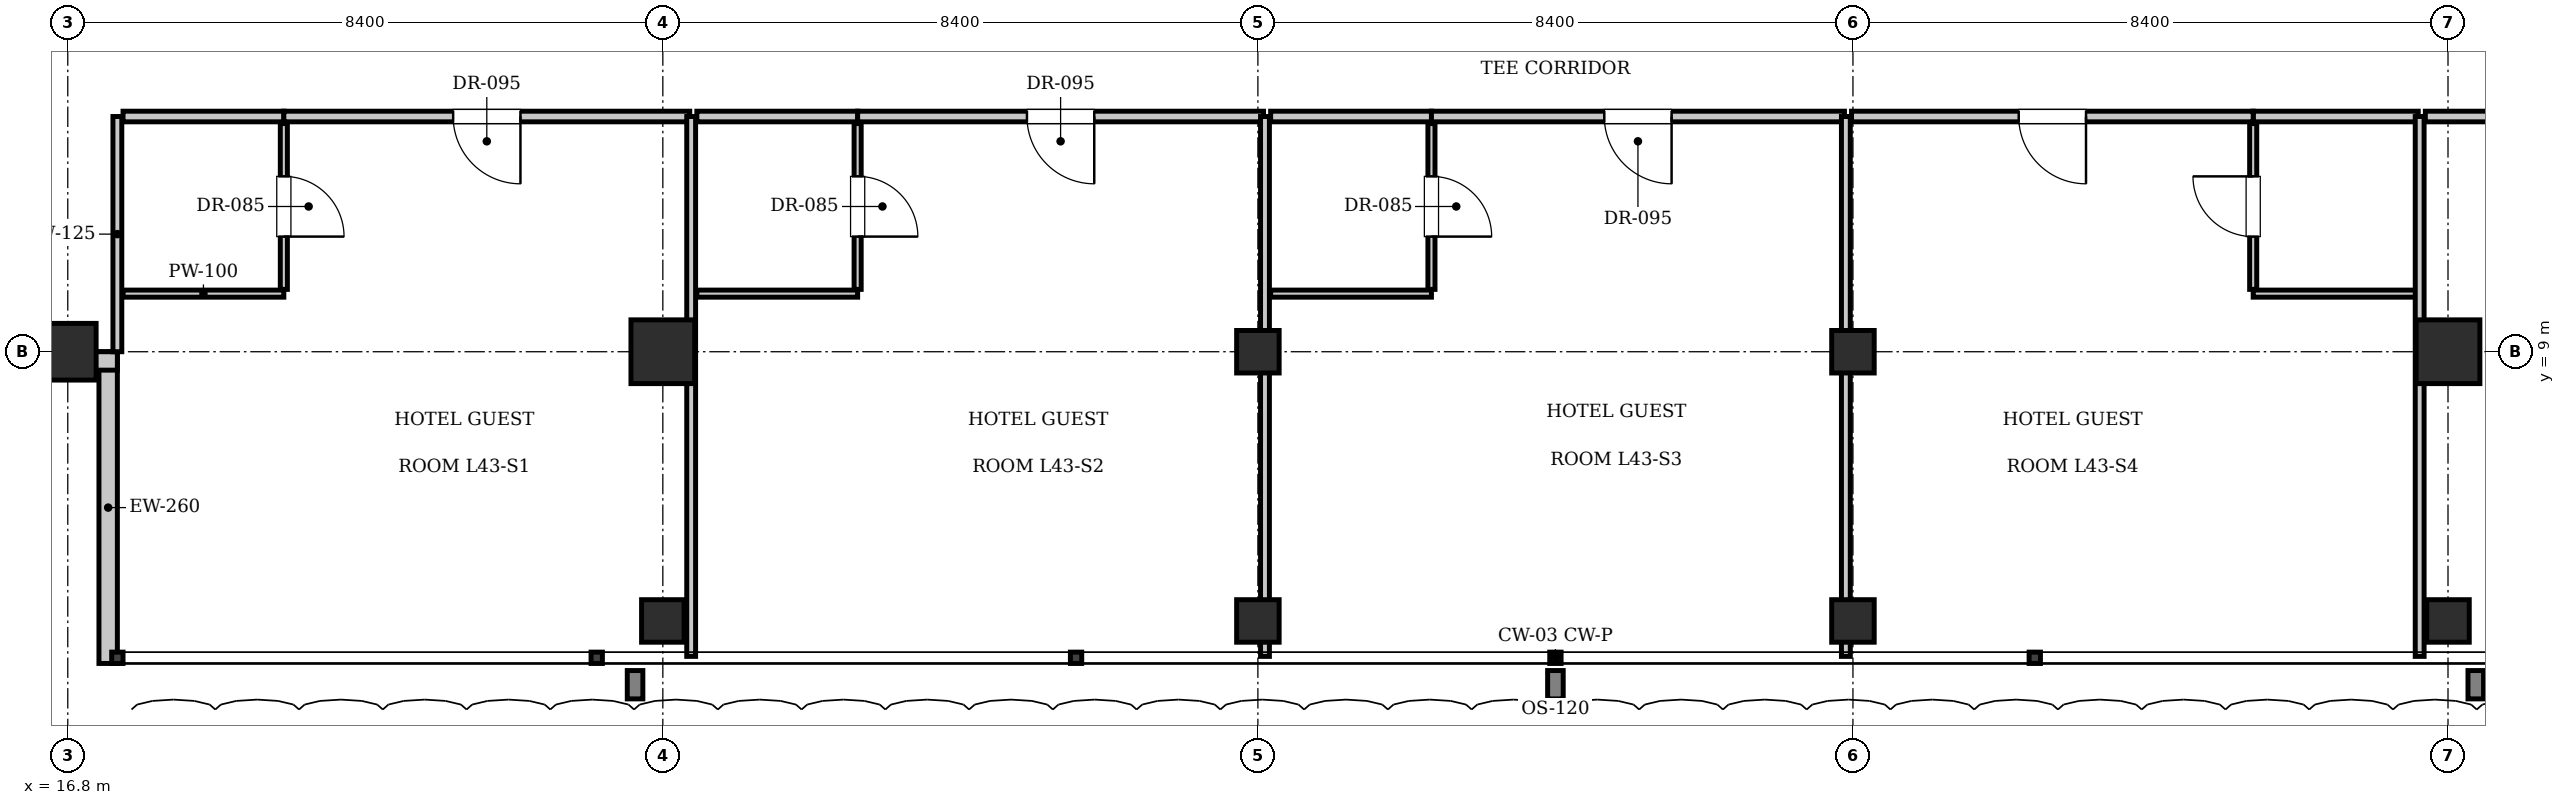
"""IFC4 building model, lengths in metres.
Left out: names, types, materials, properties, quantities, classifications, styles, units other than length and angle.
Written with IfcOpenShell. Run it as: python <this file> out.ifc"""

import sys

from ifc_helpers import new_model, si_unit, direction, frame, frame_2d, origin, origin_2d, place, context, subcontext, project, spatial, rectangle, i_section, extrude, element, fill, save


model = new_model("IFC4")
c1 = context("Model", 3, precision=1e-05, world=origin(), true_north=direction((0.0, 1.0)))
c2 = subcontext(c1, "Body", "Model", "MODEL_VIEW")
j1 = project(units=[si_unit("LENGTHUNIT", "METRE"), si_unit("PLANEANGLEUNIT", "RADIAN")], contexts=[c1])
p1 = place(None, origin())
s1 = spatial("IfcSite", under=j1, at=p1, CompositionType="ELEMENT")
p2 = place(p1, origin())
s2 = spatial("IfcBuilding", under=s1, at=p2, CompositionType="ELEMENT")
p3 = place(p2, frame((0.0, 0.0, 177.45)))
s3 = spatial("IfcBuildingStorey", under=s2, at=p3, CompositionType="ELEMENT", Elevation=177.45)
for number, where, z_axis, x_axis in (
    (1, (25.2, 9.0, 0.0), (0.0, 0.0, 1.0), (1.0, 0.0, 0.0)),
    (2, (50.4, 9.0, 0.0), (0.0, 0.0, 1.0), (1.0, 0.0, 0.0)),
):
    element("IfcColumn", number, at=place(p3, frame(where, z_axis=z_axis, x_axis=x_axis)), inside=s3, PredefinedType="COLUMN", context=c2, shape_type="SweptSolid", body=[
        extrude(rectangle(XDim=0.9, YDim=0.9, at=origin_2d()), origin(), (0.0, 0.0, 1.0), 3.85),
    ])
for number, where, z_axis, x_axis in (
    (3, (33.6, 9.0, 0.0), (0.0, 0.0, 1.0), (1.0, 0.0, 0.0)),
    (4, (42.0, 9.0, 0.0), (0.0, 0.0, 1.0), (1.0, 0.0, 0.0)),
):
    element("IfcColumn", number, at=place(p3, frame(where, z_axis=z_axis, x_axis=x_axis)), inside=s3, PredefinedType="COLUMN", context=c2, shape_type="SweptSolid", body=[
        extrude(i_section(OverallWidth=0.6, OverallDepth=0.6, WebThickness=0.025, FlangeThickness=0.038, at=origin_2d()), origin(), (0.0, 0.0, 1.0), 3.85),
    ])
p4 = place(p3, frame((16.8, 9.0, 0.0), z_axis=(0.0, 0.0, 1.0), x_axis=(1.0, 0.0, 0.0)))
e5 = element("IfcColumn", 5, at=p4, inside=s3, PredefinedType="COLUMN", context=c2, shape_type="SweptSolid", body=[
    extrude(rectangle(XDim=0.8, YDim=0.8, at=origin_2d()), origin(), (0.0, 0.0, 1.0), 3.85),
])
for number, where, z_axis, x_axis in (
    (6, (25.2, 5.2, 0.0), (0.0, 0.0, 1.0), (1.0, 0.0, 0.0)),
    (7, (33.6, 5.2, 0.0), (0.0, 0.0, 1.0), (1.0, 0.0, 0.0)),
    (8, (42.0, 5.2, 0.0), (0.0, 0.0, 1.0), (1.0, 0.0, 0.0)),
    (9, (50.4, 5.2, 0.0), (0.0, 0.0, 1.0), (1.0, 0.0, 0.0)),
):
    element("IfcColumn", number, at=place(p3, frame(where, z_axis=z_axis, x_axis=x_axis)), inside=s3, PredefinedType="COLUMN", context=c2, shape_type="SweptSolid", body=[
        extrude(i_section(OverallWidth=0.6, OverallDepth=0.6, WebThickness=0.025, FlangeThickness=0.038, at=origin_2d()), origin(), (0.0, 0.0, 1.0), 3.85),
    ])
p5 = place(p3, frame((17.37, 4.6, 0.0), z_axis=(0.0, 0.0, 1.0), x_axis=(0.0, 1.0, 0.0)))
e10 = element("IfcWall", 10, at=p5, inside=s3, PredefinedType="SOLIDWALL", context=c2, shape_type="SweptSolid", body=[
    extrude(rectangle(XDim=4.4, YDim=0.26, at=frame_2d((2.2, 0.0))), origin(), (0.0, 0.0, 1.0), 3.61),
])
p6 = place(p3, frame((17.5, 8.87, 0.0), z_axis=(0.0, 0.0, 1.0), x_axis=(-1.0, 0.0, 0.0)))
e11 = element("IfcWall", 11, at=p6, inside=s3, PredefinedType="SOLIDWALL", context=c2, shape_type="SweptSolid", body=[
    extrude(rectangle(XDim=4.4, YDim=0.26, at=frame_2d((2.2, 0.0))), origin(), (0.0, 0.0, 1.0), 3.007),
])
p7 = place(p3, frame((17.5, 9.0, 0.0), z_axis=(0.0, 0.0, 1.0), x_axis=(0.0, 1.0, 0.0)))
e12 = element("IfcWall", 12, at=p7, inside=s3, PredefinedType="PARTITIONING", context=c2, shape_type="SweptSolid", body=[
    extrude(rectangle(XDim=3.32, YDim=0.125, at=frame_2d((1.66, 0.0))), origin(), (0.0, 0.0, 1.0), 3.61),
])
p8 = place(p3, frame((17.58, 12.32, 0.0), z_axis=(0.0, 0.0, 1.0), x_axis=(1.0, 0.0, 0.0)))
e13 = element("IfcWall", 13, at=p8, inside=s3, PredefinedType="PARTITIONING", context=c2, shape_type="SweptSolid", body=[
    extrude(rectangle(XDim=2.27, YDim=0.15, at=frame_2d((1.135, 0.0))), origin(), (0.0, 0.0, 1.0), 3.61),
])
p9 = place(p3, frame((17.58, 9.82, 0.0), z_axis=(0.0, 0.0, 1.0), x_axis=(1.0, 0.0, 0.0)))
e14 = element("IfcWall", 14, at=p9, inside=s3, PredefinedType="PARTITIONING", context=c2, shape_type="SweptSolid", body=[
    extrude(rectangle(XDim=2.27, YDim=0.1, at=frame_2d((1.135, 0.0))), origin(), (0.0, 0.0, 1.0), 3.61),
])
p10 = place(p3, frame((19.85, 9.88, 0.0), z_axis=(0.0, 0.0, 1.0), x_axis=(0.0, 1.0, 0.0)))
e15 = element("IfcWall", 15, at=p10, inside=s3, PredefinedType="PARTITIONING", context=c2, shape_type="SweptSolid", body=[
    extrude(rectangle(XDim=2.34, YDim=0.1, at=frame_2d((1.17, 0.0))), origin(), (0.0, 0.0, 1.0), 3.61),
])
p11 = place(p10, frame((0.745, 0.0, 0.0)))
e16 = element("IfcOpeningElement", 16, at=p11, cuts=e15, PredefinedType="OPENING", context=c2, shape_type="SweptSolid", body=[
    extrude(rectangle(XDim=0.85, YDim=2.1, at=frame_2d((0.425, 1.05))), frame((0.0, 0.06, 0.0), z_axis=(0.0, -1.0, 0.0), x_axis=(1.0, 0.0, 0.0)), (0.0, 0.0, 1.0), 0.12),
])
p12 = place(p3, frame((19.85, 12.32, 0.0), z_axis=(0.0, 0.0, 1.0), x_axis=(1.0, 0.0, 0.0)))
e17 = element("IfcWall", 17, at=p12, inside=s3, PredefinedType="PARTITIONING", context=c2, shape_type="SweptSolid", body=[
    extrude(rectangle(XDim=5.73, YDim=0.15, at=frame_2d((2.865, 0.0))), origin(), (0.0, 0.0, 1.0), 3.61),
])
p13 = place(p12, frame((2.39, 0.0, 0.0)))
e18 = element("IfcOpeningElement", 18, at=p13, cuts=e17, PredefinedType="OPENING", context=c2, shape_type="SweptSolid", body=[
    extrude(rectangle(XDim=0.95, YDim=2.15, at=frame_2d((0.475, 1.075))), frame((0.0, 0.085, 0.0), z_axis=(0.0, -1.0, 0.0), x_axis=(1.0, 0.0, 0.0)), (0.0, 0.0, 1.0), 0.17),
])
p14 = place(p3, frame((25.6, 4.7, 0.0), z_axis=(0.0, 0.0, 1.0), x_axis=(0.0, 1.0, 0.0)))
e19 = element("IfcWall", 19, at=p14, inside=s3, PredefinedType="PARTITIONING", context=c2, shape_type="SweptSolid", body=[
    extrude(rectangle(XDim=7.62, YDim=0.125, at=frame_2d((3.81, 0.0))), origin(), (0.0, 0.0, 1.0), 3.61),
])
p15 = place(p3, frame((25.68, 12.32, 0.0), z_axis=(0.0, 0.0, 1.0), x_axis=(1.0, 0.0, 0.0)))
e20 = element("IfcWall", 20, at=p15, inside=s3, PredefinedType="PARTITIONING", context=c2, shape_type="SweptSolid", body=[
    extrude(rectangle(XDim=2.27, YDim=0.15, at=frame_2d((1.135, 0.0))), origin(), (0.0, 0.0, 1.0), 3.61),
])
p16 = place(p3, frame((25.68, 9.82, 0.0), z_axis=(0.0, 0.0, 1.0), x_axis=(1.0, 0.0, 0.0)))
e21 = element("IfcWall", 21, at=p16, inside=s3, PredefinedType="PARTITIONING", context=c2, shape_type="SweptSolid", body=[
    extrude(rectangle(XDim=2.27, YDim=0.1, at=frame_2d((1.135, 0.0))), origin(), (0.0, 0.0, 1.0), 3.61),
])
p17 = place(p3, frame((27.95, 9.88, 0.0), z_axis=(0.0, 0.0, 1.0), x_axis=(0.0, 1.0, 0.0)))
e22 = element("IfcWall", 22, at=p17, inside=s3, PredefinedType="PARTITIONING", context=c2, shape_type="SweptSolid", body=[
    extrude(rectangle(XDim=2.34, YDim=0.1, at=frame_2d((1.17, 0.0))), origin(), (0.0, 0.0, 1.0), 3.61),
])
p18 = place(p17, frame((0.745, 0.0, 0.0)))
e23 = element("IfcOpeningElement", 23, at=p18, cuts=e22, PredefinedType="OPENING", context=c2, shape_type="SweptSolid", body=[
    extrude(rectangle(XDim=0.85, YDim=2.1, at=frame_2d((0.425, 1.05))), frame((0.0, 0.06, 0.0), z_axis=(0.0, -1.0, 0.0), x_axis=(1.0, 0.0, 0.0)), (0.0, 0.0, 1.0), 0.12),
])
p19 = place(p3, frame((27.95, 12.32, 0.0), z_axis=(0.0, 0.0, 1.0), x_axis=(1.0, 0.0, 0.0)))
e24 = element("IfcWall", 24, at=p19, inside=s3, PredefinedType="PARTITIONING", context=c2, shape_type="SweptSolid", body=[
    extrude(rectangle(XDim=5.73, YDim=0.15, at=frame_2d((2.865, 0.0))), origin(), (0.0, 0.0, 1.0), 3.61),
])
p20 = place(p19, frame((2.39, 0.0, 0.0)))
e25 = element("IfcOpeningElement", 25, at=p20, cuts=e24, PredefinedType="OPENING", context=c2, shape_type="SweptSolid", body=[
    extrude(rectangle(XDim=0.95, YDim=2.15, at=frame_2d((0.475, 1.075))), frame((0.0, 0.085, 0.0), z_axis=(0.0, -1.0, 0.0), x_axis=(1.0, 0.0, 0.0)), (0.0, 0.0, 1.0), 0.17),
])
p21 = place(p3, frame((33.7, 4.7, 0.0), z_axis=(0.0, 0.0, 1.0), x_axis=(0.0, 1.0, 0.0)))
e26 = element("IfcWall", 26, at=p21, inside=s3, PredefinedType="PARTITIONING", context=c2, shape_type="SweptSolid", body=[
    extrude(rectangle(XDim=7.62, YDim=0.125, at=frame_2d((3.81, 0.0))), origin(), (0.0, 0.0, 1.0), 3.007),
])
p22 = place(p3, frame((33.78, 12.32, 0.0), z_axis=(0.0, 0.0, 1.0), x_axis=(1.0, 0.0, 0.0)))
e27 = element("IfcWall", 27, at=p22, inside=s3, PredefinedType="PARTITIONING", context=c2, shape_type="SweptSolid", body=[
    extrude(rectangle(XDim=2.27, YDim=0.15, at=frame_2d((1.135, 0.0))), origin(), (0.0, 0.0, 1.0), 3.61),
])
p23 = place(p3, frame((33.78, 9.82, 0.0), z_axis=(0.0, 0.0, 1.0), x_axis=(1.0, 0.0, 0.0)))
e28 = element("IfcWall", 28, at=p23, inside=s3, PredefinedType="PARTITIONING", context=c2, shape_type="SweptSolid", body=[
    extrude(rectangle(XDim=2.27, YDim=0.1, at=frame_2d((1.135, 0.0))), origin(), (0.0, 0.0, 1.0), 3.61),
])
p24 = place(p3, frame((36.05, 9.88, 0.0), z_axis=(0.0, 0.0, 1.0), x_axis=(0.0, 1.0, 0.0)))
e29 = element("IfcWall", 29, at=p24, inside=s3, PredefinedType="PARTITIONING", context=c2, shape_type="SweptSolid", body=[
    extrude(rectangle(XDim=2.34, YDim=0.1, at=frame_2d((1.17, 0.0))), origin(), (0.0, 0.0, 1.0), 3.61),
])
p25 = place(p24, frame((0.745, 0.0, 0.0)))
e30 = element("IfcOpeningElement", 30, at=p25, cuts=e29, PredefinedType="OPENING", context=c2, shape_type="SweptSolid", body=[
    extrude(rectangle(XDim=0.85, YDim=2.1, at=frame_2d((0.425, 1.05))), frame((0.0, 0.06, 0.0), z_axis=(0.0, -1.0, 0.0), x_axis=(1.0, 0.0, 0.0)), (0.0, 0.0, 1.0), 0.12),
])
p26 = place(p3, frame((36.05, 12.32, 0.0), z_axis=(0.0, 0.0, 1.0), x_axis=(1.0, 0.0, 0.0)))
e31 = element("IfcWall", 31, at=p26, inside=s3, PredefinedType="PARTITIONING", context=c2, shape_type="SweptSolid", body=[
    extrude(rectangle(XDim=5.83, YDim=0.15, at=frame_2d((2.915, 0.0))), origin(), (0.0, 0.0, 1.0), 3.61),
])
p27 = place(p26, frame((2.44, 0.0, 0.0)))
e32 = element("IfcOpeningElement", 32, at=p27, cuts=e31, PredefinedType="OPENING", context=c2, shape_type="SweptSolid", body=[
    extrude(rectangle(XDim=0.95, YDim=2.15, at=frame_2d((0.475, 1.075))), frame((0.0, 0.085, 0.0), z_axis=(0.0, -1.0, 0.0), x_axis=(1.0, 0.0, 0.0)), (0.0, 0.0, 1.0), 0.17),
])
p28 = place(p3, frame((41.9, 4.7, 0.0), z_axis=(0.0, 0.0, 1.0), x_axis=(0.0, 1.0, 0.0)))
e33 = element("IfcWall", 33, at=p28, inside=s3, PredefinedType="PARTITIONING", context=c2, shape_type="SweptSolid", body=[
    extrude(rectangle(XDim=7.62, YDim=0.125, at=frame_2d((3.81, 0.0))), origin(), (0.0, 0.0, 1.0), 3.007),
])
p29 = place(p3, frame((47.65, 12.32, 0.0), z_axis=(0.0, 0.0, 1.0), x_axis=(1.0, 0.0, 0.0)))
e34 = element("IfcWall", 34, at=p29, inside=s3, PredefinedType="PARTITIONING", context=c2, shape_type="SweptSolid", body=[
    extrude(rectangle(XDim=2.33, YDim=0.15, at=frame_2d((1.165, 0.0))), origin(), (0.0, 0.0, 1.0), 3.61),
])
p30 = place(p3, frame((47.65, 9.82, 0.0), z_axis=(0.0, 0.0, 1.0), x_axis=(1.0, 0.0, 0.0)))
e35 = element("IfcWall", 35, at=p30, inside=s3, PredefinedType="PARTITIONING", context=c2, shape_type="SweptSolid", body=[
    extrude(rectangle(XDim=2.31, YDim=0.1, at=frame_2d((1.155, 0.0))), origin(), (0.0, 0.0, 1.0), 3.61),
])
p31 = place(p3, frame((47.65, 9.88, 0.0), z_axis=(0.0, 0.0, 1.0), x_axis=(0.0, 1.0, 0.0)))
e36 = element("IfcWall", 36, at=p31, inside=s3, PredefinedType="PARTITIONING", context=c2, shape_type="SweptSolid", body=[
    extrude(rectangle(XDim=2.34, YDim=0.1, at=frame_2d((1.17, 0.0))), origin(), (0.0, 0.0, 1.0), 3.61),
])
p32 = place(p31, frame((0.745, 0.0, 0.0)))
e37 = element("IfcOpeningElement", 37, at=p32, cuts=e36, PredefinedType="OPENING", context=c2, shape_type="SweptSolid", body=[
    extrude(rectangle(XDim=0.85, YDim=2.1, at=frame_2d((0.425, 1.05))), frame((0.0, 0.06, 0.0), z_axis=(0.0, -1.0, 0.0), x_axis=(1.0, 0.0, 0.0)), (0.0, 0.0, 1.0), 0.12),
])
p33 = place(p3, frame((41.98, 12.32, 0.0), z_axis=(0.0, 0.0, 1.0), x_axis=(1.0, 0.0, 0.0)))
e38 = element("IfcWall", 38, at=p33, inside=s3, PredefinedType="PARTITIONING", context=c2, shape_type="SweptSolid", body=[
    extrude(rectangle(XDim=5.67, YDim=0.15, at=frame_2d((2.835, 0.0))), origin(), (0.0, 0.0, 1.0), 3.61),
])
p34 = place(p33, frame((2.36, 0.0, 0.0)))
e39 = element("IfcOpeningElement", 39, at=p34, cuts=e38, PredefinedType="OPENING", context=c2, shape_type="SweptSolid", body=[
    extrude(rectangle(XDim=0.95, YDim=2.15, at=frame_2d((0.475, 1.075))), frame((0.0, 0.085, 0.0), z_axis=(0.0, -1.0, 0.0), x_axis=(1.0, 0.0, 0.0)), (0.0, 0.0, 1.0), 0.17),
])
p35 = place(p3, frame((50.0, 4.7, 0.0), z_axis=(0.0, 0.0, 1.0), x_axis=(0.0, 1.0, 0.0)))
e40 = element("IfcWall", 40, at=p35, inside=s3, PredefinedType="PARTITIONING", context=c2, shape_type="SweptSolid", body=[
    extrude(rectangle(XDim=7.62, YDim=0.125, at=frame_2d((3.81, 0.0))), origin(), (0.0, 0.0, 1.0), 3.61),
])
p36 = place(p3, frame((50.08, 12.32, 0.0), z_axis=(0.0, 0.0, 1.0), x_axis=(1.0, 0.0, 0.0)))
e41 = element("IfcWall", 41, at=p36, inside=s3, PredefinedType="PARTITIONING", context=c2, shape_type="SweptSolid", body=[
    extrude(rectangle(XDim=5.67, YDim=0.15, at=frame_2d((2.835, 0.0))), origin(), (0.0, 0.0, 1.0), 3.61),
])
p37 = place(p36, frame((2.36, 0.0, 0.0)))
e42 = element("IfcOpeningElement", 42, at=p37, cuts=e41, PredefinedType="OPENING", context=c2, shape_type="SweptSolid", body=[
    extrude(rectangle(XDim=0.95, YDim=2.15, at=frame_2d((0.475, 1.075))), frame((0.0, 0.085, 0.0), z_axis=(0.0, -1.0, 0.0), x_axis=(1.0, 0.0, 0.0)), (0.0, 0.0, 1.0), 0.17),
])
p38 = place(p11, frame((0.85, 0.0, 0.0), z_axis=(0.0, 0.0, 1.0), x_axis=(-1.0, 0.0, 0.0)))
e43 = element("IfcDoor", 43, at=p38, inside=s3, OperationType="SINGLE_SWING_RIGHT", PredefinedType="DOOR", context=c2, shape_type="SweptSolid", body=[
    extrude(rectangle(XDim=0.85, YDim=2.1, at=frame_2d((0.425, 1.05))), frame((0.0, 0.025, 0.0), z_axis=(0.0, -1.0, 0.0), x_axis=(1.0, 0.0, 0.0)), (0.0, 0.0, 1.0), 0.05),
])
fill(e16, e43)
p39 = place(p13, frame((0.95, 0.0, 0.0), z_axis=(0.0, 0.0, 1.0), x_axis=(-1.0, 0.0, 0.0)))
e44 = element("IfcDoor", 44, at=p39, inside=s3, OperationType="SINGLE_SWING_LEFT", PredefinedType="DOOR", context=c2, shape_type="SweptSolid", body=[
    extrude(rectangle(XDim=0.95, YDim=2.15, at=frame_2d((0.475, 1.075))), frame((0.0, 0.025, 0.0), z_axis=(0.0, -1.0, 0.0), x_axis=(1.0, 0.0, 0.0)), (0.0, 0.0, 1.0), 0.05),
])
fill(e18, e44)
p40 = place(p18, frame((0.85, 0.0, 0.0), z_axis=(0.0, 0.0, 1.0), x_axis=(-1.0, 0.0, 0.0)))
e45 = element("IfcDoor", 45, at=p40, inside=s3, OperationType="SINGLE_SWING_RIGHT", PredefinedType="DOOR", context=c2, shape_type="SweptSolid", body=[
    extrude(rectangle(XDim=0.85, YDim=2.1, at=frame_2d((0.425, 1.05))), frame((0.0, 0.025, 0.0), z_axis=(0.0, -1.0, 0.0), x_axis=(1.0, 0.0, 0.0)), (0.0, 0.0, 1.0), 0.05),
])
fill(e23, e45)
p41 = place(p20, frame((0.95, 0.0, 0.0), z_axis=(0.0, 0.0, 1.0), x_axis=(-1.0, 0.0, 0.0)))
e46 = element("IfcDoor", 46, at=p41, inside=s3, OperationType="SINGLE_SWING_LEFT", PredefinedType="DOOR", context=c2, shape_type="SweptSolid", body=[
    extrude(rectangle(XDim=0.95, YDim=2.15, at=frame_2d((0.475, 1.075))), frame((0.0, 0.025, 0.0), z_axis=(0.0, -1.0, 0.0), x_axis=(1.0, 0.0, 0.0)), (0.0, 0.0, 1.0), 0.05),
])
fill(e25, e46)
p42 = place(p25, frame((0.85, 0.0, 0.0), z_axis=(0.0, 0.0, 1.0), x_axis=(-1.0, 0.0, 0.0)))
e47 = element("IfcDoor", 47, at=p42, inside=s3, OperationType="SINGLE_SWING_RIGHT", PredefinedType="DOOR", context=c2, shape_type="SweptSolid", body=[
    extrude(rectangle(XDim=0.85, YDim=2.1, at=frame_2d((0.425, 1.05))), frame((0.0, 0.025, 0.0), z_axis=(0.0, -1.0, 0.0), x_axis=(1.0, 0.0, 0.0)), (0.0, 0.0, 1.0), 0.05),
])
fill(e30, e47)
p43 = place(p27, frame((0.95, 0.0, 0.0), z_axis=(0.0, 0.0, 1.0), x_axis=(-1.0, 0.0, 0.0)))
e48 = element("IfcDoor", 48, at=p43, inside=s3, OperationType="SINGLE_SWING_LEFT", PredefinedType="DOOR", context=c2, shape_type="SweptSolid", body=[
    extrude(rectangle(XDim=0.95, YDim=2.15, at=frame_2d((0.475, 1.075))), frame((0.0, 0.025, 0.0), z_axis=(0.0, -1.0, 0.0), x_axis=(1.0, 0.0, 0.0)), (0.0, 0.0, 1.0), 0.05),
])
fill(e32, e48)
p44 = place(p32, origin())
e49 = element("IfcDoor", 49, at=p44, inside=s3, OperationType="SINGLE_SWING_RIGHT", PredefinedType="DOOR", context=c2, shape_type="SweptSolid", body=[
    extrude(rectangle(XDim=0.85, YDim=2.1, at=frame_2d((0.425, 1.05))), frame((0.0, 0.025, 0.0), z_axis=(0.0, -1.0, 0.0), x_axis=(1.0, 0.0, 0.0)), (0.0, 0.0, 1.0), 0.05),
])
fill(e37, e49)
p45 = place(p34, frame((0.95, 0.0, 0.0), z_axis=(0.0, 0.0, 1.0), x_axis=(-1.0, 0.0, 0.0)))
e50 = element("IfcDoor", 50, at=p45, inside=s3, OperationType="SINGLE_SWING_LEFT", PredefinedType="DOOR", context=c2, shape_type="SweptSolid", body=[
    extrude(rectangle(XDim=0.95, YDim=2.15, at=frame_2d((0.475, 1.075))), frame((0.0, 0.025, 0.0), z_axis=(0.0, -1.0, 0.0), x_axis=(1.0, 0.0, 0.0)), (0.0, 0.0, 1.0), 0.05),
])
fill(e39, e50)
save(model, sys.argv[1])
